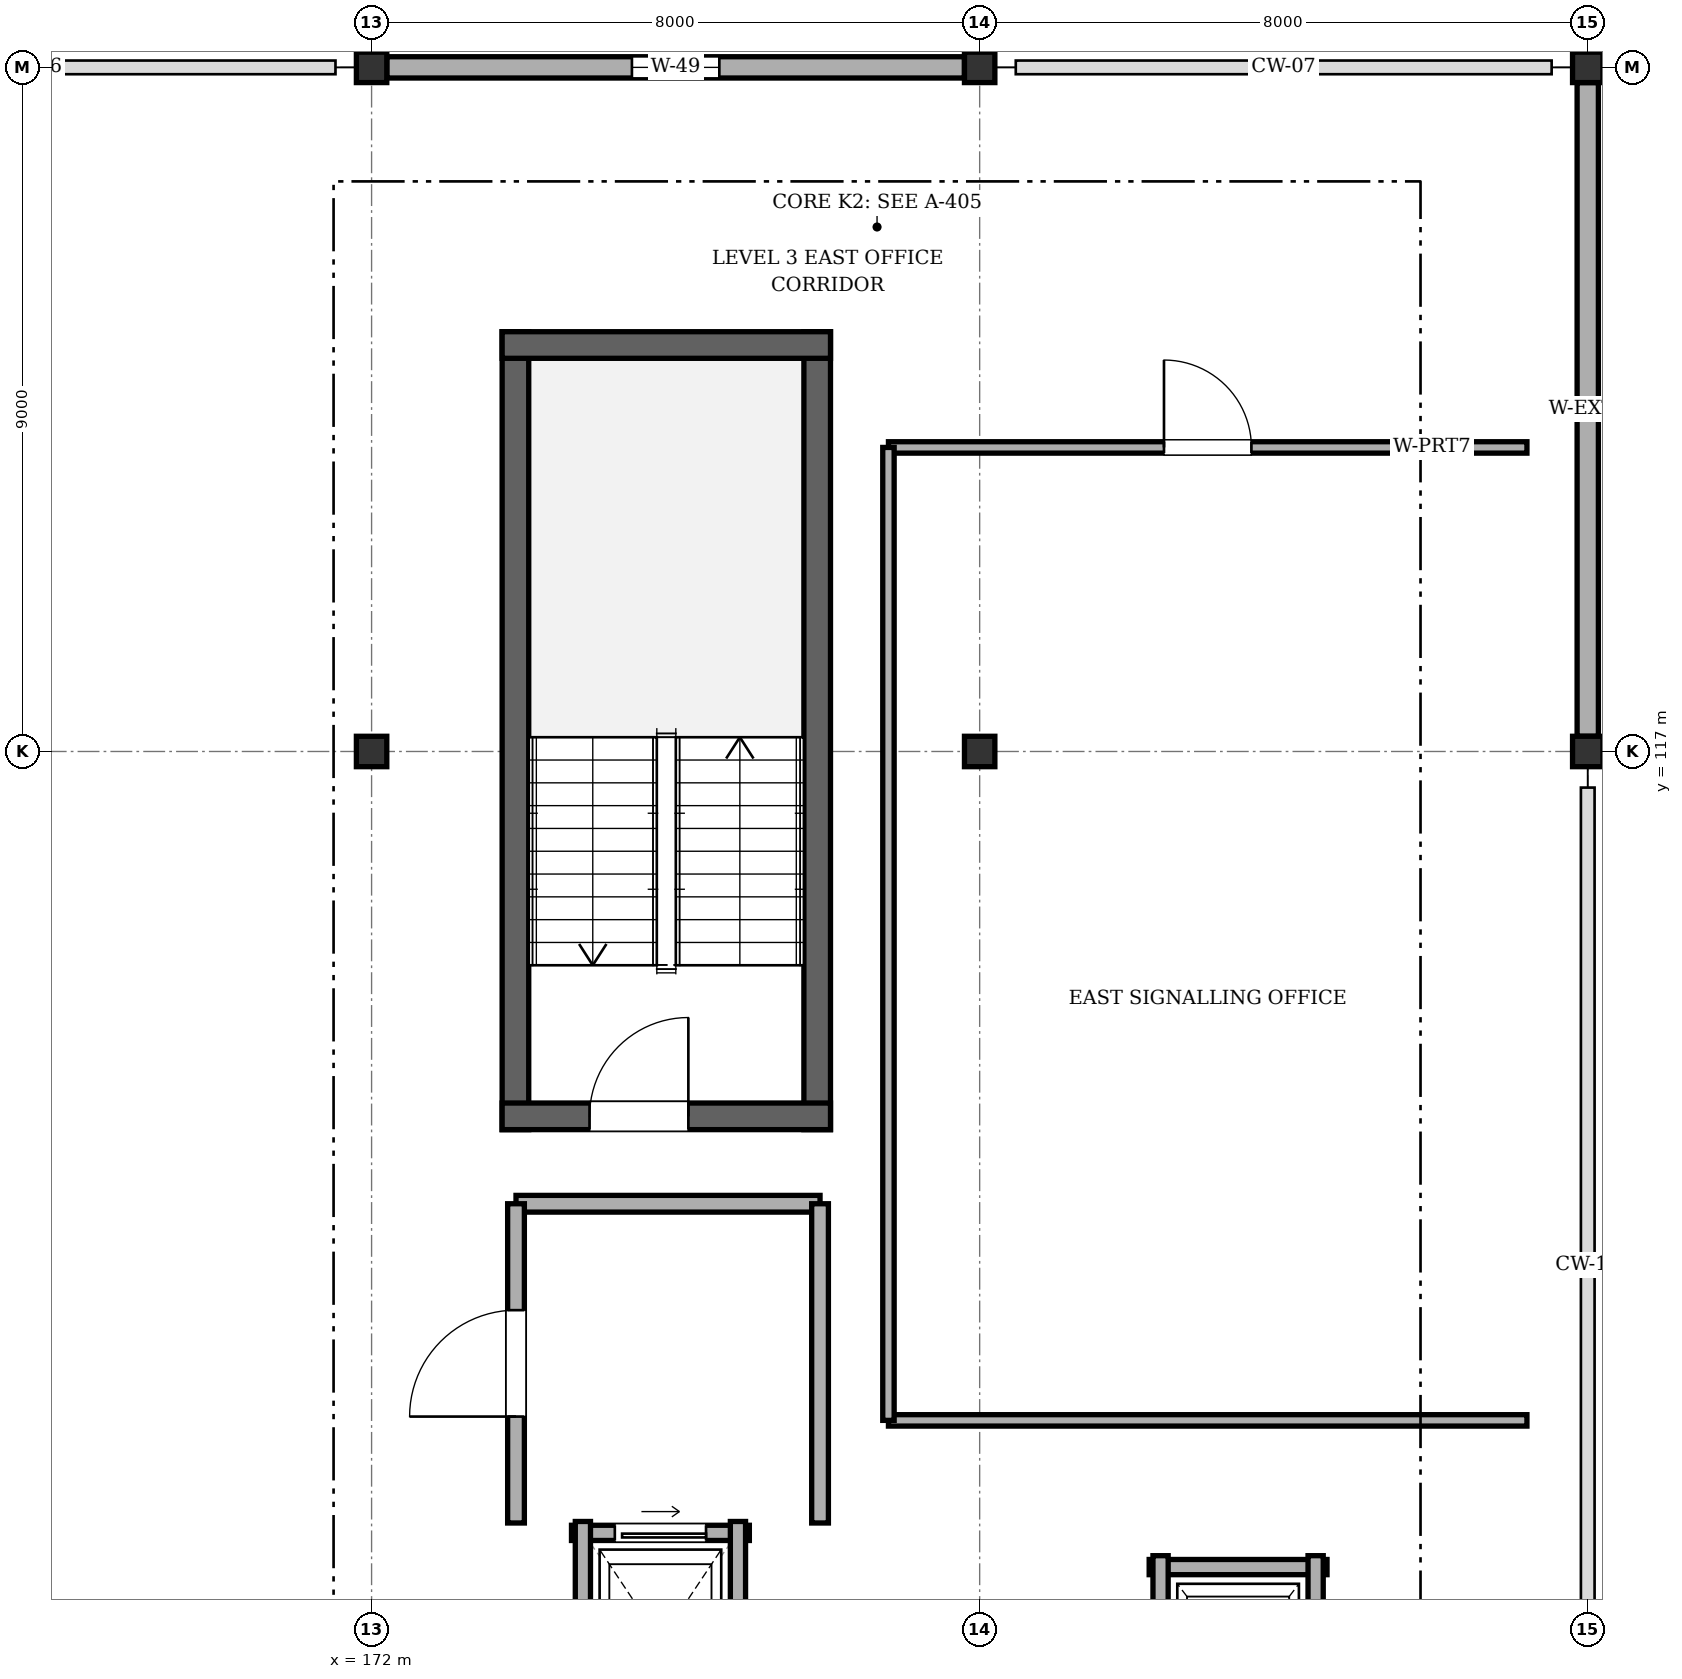
"""IFC4 building model, lengths in metres.
Left out: names, types, materials, properties, quantities, classifications, styles, units other than length and angle.
Written with IfcOpenShell. Run it as: python <this file> out.ifc"""

import sys

from ifc_helpers import new_model, si_unit, direction, frame, frame_2d, origin, origin_2d, place, context, subcontext, project, spatial, rectangle, i_section, extrude, element, fill, save


model = new_model("IFC4")
c1 = context("Model", 3, precision=1e-05, world=origin(), true_north=direction((0.0, 1.0)))
c2 = subcontext(c1, "Body", "Model", "MODEL_VIEW")
j1 = project(units=[si_unit("LENGTHUNIT", "METRE"), si_unit("PLANEANGLEUNIT", "RADIAN")], contexts=[c1])
p1 = place(None, origin())
s1 = spatial("IfcSite", under=j1, at=p1, CompositionType="ELEMENT")
p2 = place(p1, origin())
s2 = spatial("IfcBuilding", under=s1, at=p2, CompositionType="ELEMENT")
p3 = place(p2, frame((0.0, 0.0, 14.4)))
s3 = spatial("IfcBuildingStorey", under=s2, at=p3, CompositionType="ELEMENT", Elevation=14.4)
for number, where, z_axis, x_axis in (
    (1, (172.0, 117.0, 0.0), (0.0, 0.0, 1.0), (1.0, 0.0, 0.0)),
    (2, (172.0, 126.0, 0.0), (0.0, 0.0, 1.0), (1.0, 0.0, 0.0)),
    (3, (180.0, 117.0, 0.0), (0.0, 0.0, 1.0), (1.0, 0.0, 0.0)),
    (4, (180.0, 126.0, 0.0), (0.0, 0.0, 1.0), (1.0, 0.0, 0.0)),
    (5, (188.0, 117.0, 0.0), (0.0, 0.0, 1.0), (1.0, 0.0, 0.0)),
    (6, (188.0, 126.0, 0.0), (0.0, 0.0, 1.0), (1.0, 0.0, 0.0)),
):
    element("IfcColumn", number, at=place(p3, frame(where, z_axis=z_axis, x_axis=x_axis)), inside=s3, PredefinedType="COLUMN", context=c2, shape_type="SweptSolid", body=[
        extrude(i_section(OverallWidth=0.4, OverallDepth=0.4, WebThickness=0.013, FlangeThickness=0.021, FilletRadius=0.022, at=origin_2d()), origin(), (0.0, 0.0, 1.0), 3.2),
    ])
p4 = place(p3, frame((172.2, 126.0, 0.0), z_axis=(0.0, 0.0, 1.0), x_axis=(1.0, 0.0, 0.0)))
e7 = element("IfcWall", 7, at=p4, inside=s3, PredefinedType="SOLIDWALL", context=c2, shape_type="SweptSolid", body=[
    extrude(rectangle(XDim=7.6, YDim=0.28, at=frame_2d((3.8, 0.0))), origin(), (0.0, 0.0, 1.0), 2.515),
])
p5 = place(p4, frame((3.225, 0.0, 0.9)))
e8 = element("IfcOpeningElement", 8, at=p5, cuts=e7, PredefinedType="OPENING", context=c2, shape_type="SweptSolid", body=[
    extrude(rectangle(XDim=1.15, YDim=1.45, at=frame_2d((0.575, 0.725))), frame((0.0, 0.15, 0.0), z_axis=(0.0, -1.0, 0.0), x_axis=(1.0, 0.0, 0.0)), (0.0, 0.0, 1.0), 0.3),
])
p6 = place(p3, frame((188.0, 125.8, 0.0), z_axis=(0.0, 0.0, 1.0), x_axis=(0.0, -1.0, 0.0)))
e9 = element("IfcWall", 9, at=p6, inside=s3, PredefinedType="SOLIDWALL", context=c2, shape_type="SweptSolid", body=[
    extrude(rectangle(XDim=8.6, YDim=0.28, at=frame_2d((4.3, 0.0))), origin(), (0.0, 0.0, 1.0), 2.395),
])
for number, where, z_axis, x_axis in (
    (10, (177.863, 112.025, 0.0), (0.0, 0.0, 1.0), (0.0, 1.0, 0.0)),
    (11, (173.893, 122.522, 0.0), (0.0, 0.0, 1.0), (0.0, -1.0, 0.0)),
):
    element("IfcWall", number, at=place(p3, frame(where, z_axis=z_axis, x_axis=x_axis)), inside=s3, PredefinedType="SHEAR", context=c2, shape_type="SweptSolid", body=[
        extrude(rectangle(XDim=10.498, YDim=0.35, at=frame_2d((5.249, 0.0))), origin(), (0.0, 0.0, 1.0), 3.0),
    ])
p7 = place(p3, frame((178.038, 122.347, 0.0), z_axis=(0.0, 0.0, 1.0), x_axis=(-1.0, 0.0, 0.0)))
e12 = element("IfcWall", 12, at=p7, inside=s3, PredefinedType="SHEAR", context=c2, shape_type="SweptSolid", body=[
    extrude(rectangle(XDim=4.32, YDim=0.35, at=frame_2d((2.16, 0.0))), origin(), (0.0, 0.0, 1.0), 3.0),
])
p8 = place(p3, frame((173.718, 112.2, 0.0), z_axis=(0.0, 0.0, 1.0), x_axis=(1.0, 0.0, 0.0)))
e13 = element("IfcWall", 13, at=p8, inside=s3, PredefinedType="SHEAR", context=c2, shape_type="SweptSolid", body=[
    extrude(rectangle(XDim=4.32, YDim=0.35, at=frame_2d((2.16, 0.0))), origin(), (0.0, 0.0, 1.0), 3.0),
])
p9 = place(p8, frame((1.15, 0.0, 0.0)))
e14 = element("IfcOpeningElement", 14, at=p9, cuts=e13, PredefinedType="OPENING", context=c2, shape_type="SweptSolid", body=[
    extrude(rectangle(XDim=1.3, YDim=2.1, at=frame_2d((0.65, 1.05))), frame((0.0, 0.185, 0.0), z_axis=(0.0, -1.0, 0.0), x_axis=(1.0, 0.0, 0.0)), (0.0, 0.0, 1.0), 0.37),
])
p10 = place(p3, frame((176.97, 106.72, 0.0), z_axis=(0.0, 0.0, 1.0), x_axis=(-1.0, 0.0, 0.0)))
e15 = element("IfcWall", 15, at=p10, inside=s3, PredefinedType="SOLIDWALL", context=c2, shape_type="SweptSolid", body=[
    extrude(rectangle(XDim=2.34, YDim=0.2, at=frame_2d((1.17, 0.0))), origin(), (0.0, 0.0, 1.0), 2.975),
])
p11 = place(p10, frame((0.57, 0.0, 0.0)))
e16 = element("IfcOpeningElement", 16, at=p11, cuts=e15, PredefinedType="OPENING", context=c2, shape_type="SweptSolid", body=[
    extrude(rectangle(XDim=1.2, YDim=2.15, at=frame_2d((0.6, 1.075))), frame((0.0, 0.11, 0.0), z_axis=(0.0, -1.0, 0.0), x_axis=(1.0, 0.0, 0.0)), (0.0, 0.0, 1.0), 0.22),
])
for number, where, z_axis, x_axis in (
    (17, (174.78, 106.87, 0.0), (0.0, 0.0, 1.0), (0.0, -1.0, 0.0)),
    (18, (176.82, 103.73, 0.0), (0.0, 0.0, 1.0), (0.0, 1.0, 0.0)),
):
    element("IfcWall", number, at=place(p3, frame(where, z_axis=z_axis, x_axis=x_axis)), inside=s3, PredefinedType="SOLIDWALL", context=c2, shape_type="SweptSolid", body=[
        extrude(rectangle(XDim=3.14, YDim=0.2, at=frame_2d((1.57, 0.0))), origin(), (0.0, 0.0, 1.0), 2.535),
    ])
p12 = place(p3, frame((184.57, 106.27, 0.0), z_axis=(0.0, 0.0, 1.0), x_axis=(-1.0, 0.0, 0.0)))
e19 = element("IfcWall", 19, at=p12, inside=s3, PredefinedType="SOLIDWALL", context=c2, shape_type="SweptSolid", body=[
    extrude(rectangle(XDim=2.34, YDim=0.2, at=frame_2d((1.17, 0.0))), origin(), (0.0, 0.0, 1.0), 2.975),
])
for number, where, z_axis, x_axis in (
    (20, (182.38, 106.42, 0.0), (0.0, 0.0, 1.0), (0.0, -1.0, 0.0)),
    (21, (184.42, 103.58, 0.0), (0.0, 0.0, 1.0), (0.0, 1.0, 0.0)),
):
    element("IfcWall", number, at=place(p3, frame(where, z_axis=z_axis, x_axis=x_axis)), inside=s3, PredefinedType="SOLIDWALL", context=c2, shape_type="SweptSolid", body=[
        extrude(rectangle(XDim=2.84, YDim=0.2, at=frame_2d((1.42, 0.0))), origin(), (0.0, 0.0, 1.0), 2.535),
    ])
p13 = place(p3, frame((187.2, 108.2, 0.0), z_axis=(0.0, 0.0, 1.0), x_axis=(-1.0, 0.0, 0.0)))
e22 = element("IfcWall", 22, at=p13, inside=s3, PredefinedType="PARTITIONING", context=c2, shape_type="SweptSolid", body=[
    extrude(rectangle(XDim=8.4, YDim=0.15, at=frame_2d((4.2, 0.0))), origin(), (0.0, 0.0, 1.0), 2.375),
])
p14 = place(p3, frame((178.8, 121.0, 0.0), z_axis=(0.0, 0.0, 1.0), x_axis=(1.0, 0.0, 0.0)))
e23 = element("IfcWall", 23, at=p14, inside=s3, PredefinedType="PARTITIONING", context=c2, shape_type="SweptSolid", body=[
    extrude(rectangle(XDim=8.4, YDim=0.15, at=frame_2d((4.2, 0.0))), origin(), (0.0, 0.0, 1.0), 2.515),
])
p15 = place(p14, frame((3.625, 0.0, 0.0)))
e24 = element("IfcOpeningElement", 24, at=p15, cuts=e23, PredefinedType="OPENING", context=c2, shape_type="SweptSolid", body=[
    extrude(rectangle(XDim=1.15, YDim=2.1, at=frame_2d((0.575, 1.05))), frame((0.0, 0.085, 0.0), z_axis=(0.0, -1.0, 0.0), x_axis=(1.0, 0.0, 0.0)), (0.0, 0.0, 1.0), 0.17),
])
p16 = place(p3, frame((178.8, 108.2, 0.0), z_axis=(0.0, 0.0, 1.0), x_axis=(0.0, 1.0, 0.0)))
e25 = element("IfcWall", 25, at=p16, inside=s3, PredefinedType="PARTITIONING", context=c2, shape_type="SweptSolid", body=[
    extrude(rectangle(XDim=12.8, YDim=0.15, at=frame_2d((6.4, 0.0))), origin(), (0.0, 0.0, 1.0), 2.975),
])
p17 = place(p3, frame((173.9, 111.05, 0.0), z_axis=(0.0, 0.0, 1.0), x_axis=(1.0, 0.0, 0.0)))
e26 = element("IfcWall", 26, at=p17, inside=s3, PredefinedType="SOLIDWALL", context=c2, shape_type="SweptSolid", body=[
    extrude(rectangle(XDim=4.0, YDim=0.22, at=frame_2d((2.0, 0.0))), origin(), (0.0, 0.0, 1.0), 2.975),
])
p18 = place(p3, frame((173.9, 106.85, 0.0), z_axis=(0.0, 0.0, 1.0), x_axis=(0.0, 1.0, 0.0)))
e27 = element("IfcWall", 27, at=p18, inside=s3, PredefinedType="SOLIDWALL", context=c2, shape_type="SweptSolid", body=[
    extrude(rectangle(XDim=4.2, YDim=0.22, at=frame_2d((2.1, 0.0))), origin(), (0.0, 0.0, 1.0), 2.975),
])
p19 = place(p18, frame((1.4, 0.0, 0.0)))
e28 = element("IfcOpeningElement", 28, at=p19, cuts=e27, PredefinedType="OPENING", context=c2, shape_type="SweptSolid", body=[
    extrude(rectangle(XDim=1.4, YDim=2.1, at=frame_2d((0.7, 1.05))), frame((0.0, 0.12, 0.0), z_axis=(0.0, -1.0, 0.0), x_axis=(1.0, 0.0, 0.0)), (0.0, 0.0, 1.0), 0.24),
])
p20 = place(p3, frame((177.9, 111.05, 0.0), z_axis=(0.0, 0.0, 1.0), x_axis=(0.0, -1.0, 0.0)))
e29 = element("IfcWall", 29, at=p20, inside=s3, PredefinedType="SOLIDWALL", context=c2, shape_type="SweptSolid", body=[
    extrude(rectangle(XDim=4.2, YDim=0.22, at=frame_2d((2.1, 0.0))), origin(), (0.0, 0.0, 1.0), 2.975),
])
p21 = place(p5, origin())
e30 = element("IfcWindow", 30, at=p21, inside=s3, PartitioningType="SINGLE_PANEL", PredefinedType="WINDOW", context=c2, shape_type="SweptSolid", body=[
    extrude(rectangle(XDim=1.15, YDim=1.45, at=frame_2d((0.575, 0.725))), frame((0.0, 0.03, 0.0), z_axis=(0.0, -1.0, 0.0), x_axis=(1.0, 0.0, 0.0)), (0.0, 0.0, 1.0), 0.06),
])
fill(e8, e30)
p22 = place(p9, origin())
e31 = element("IfcDoor", 31, at=p22, inside=s3, OperationType="SINGLE_SWING_RIGHT", PredefinedType="DOOR", context=c2, shape_type="SweptSolid", body=[
    extrude(rectangle(XDim=1.3, YDim=2.1, at=frame_2d((0.65, 1.05))), frame((0.0, 0.025, 0.0), z_axis=(0.0, -1.0, 0.0), x_axis=(1.0, 0.0, 0.0)), (0.0, 0.0, 1.0), 0.05),
])
fill(e14, e31)
p23 = place(p11, origin())
e32 = element("IfcDoor", 32, at=p23, inside=s3, OperationType="SLIDING_TO_LEFT", PredefinedType="DOOR", context=c2, shape_type="SweptSolid", body=[
    extrude(rectangle(XDim=1.2, YDim=2.15, at=frame_2d((0.6, 1.075))), frame((0.0, 0.025, 0.0), z_axis=(0.0, -1.0, 0.0), x_axis=(1.0, 0.0, 0.0)), (0.0, 0.0, 1.0), 0.05),
])
fill(e16, e32)
p24 = place(p15, origin())
e33 = element("IfcDoor", 33, at=p24, inside=s3, OperationType="SINGLE_SWING_LEFT", PredefinedType="DOOR", context=c2, shape_type="SweptSolid", body=[
    extrude(rectangle(XDim=1.15, YDim=2.1, at=frame_2d((0.575, 1.05))), frame((0.0, 0.025, 0.0), z_axis=(0.0, -1.0, 0.0), x_axis=(1.0, 0.0, 0.0)), (0.0, 0.0, 1.0), 0.05),
])
fill(e24, e33)
p25 = place(p19, origin())
e34 = element("IfcDoor", 34, at=p25, inside=s3, OperationType="SINGLE_SWING_LEFT", PredefinedType="DOOR", context=c2, shape_type="SweptSolid", body=[
    extrude(rectangle(XDim=1.4, YDim=2.1, at=frame_2d((0.7, 1.05))), frame((0.0, 0.025, 0.0), z_axis=(0.0, -1.0, 0.0), x_axis=(1.0, 0.0, 0.0)), (0.0, 0.0, 1.0), 0.05),
])
fill(e28, e34)
save(model, sys.argv[1])
